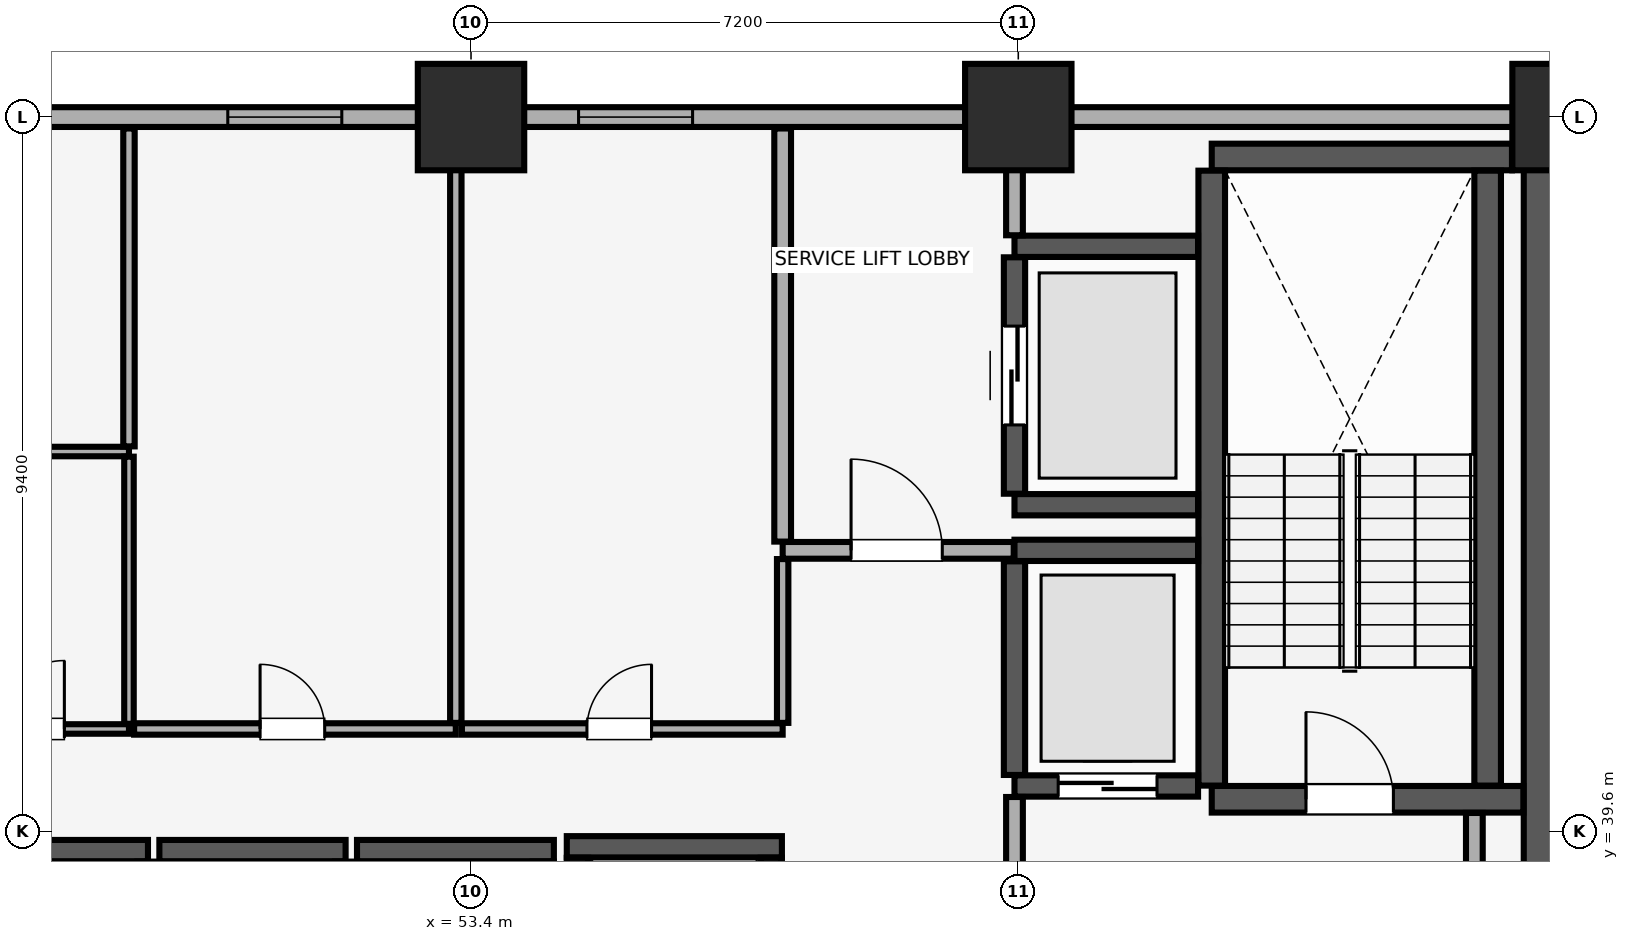
"""IFC4 building model, lengths in metres.
Left out: names, types, materials, properties, quantities, classifications, styles, units other than length and angle.
Written with IfcOpenShell. Run it as: python <this file> out.ifc"""

import sys

from ifc_helpers import new_model, si_unit, direction, frame, frame_2d, origin, origin_2d, place, context, subcontext, project, spatial, rectangle, extrude, element, fill, save


model = new_model("IFC4")
c1 = context("Model", 3, precision=1e-05, world=origin(), true_north=direction((0.0, 1.0)))
c2 = subcontext(c1, "Body", "Model", "MODEL_VIEW")
j1 = project(units=[si_unit("LENGTHUNIT", "METRE"), si_unit("PLANEANGLEUNIT", "RADIAN")], contexts=[c1])
p1 = place(None, origin())
s1 = spatial("IfcSite", under=j1, at=p1, CompositionType="ELEMENT")
p2 = place(p1, origin())
s2 = spatial("IfcBuilding", under=s1, at=p2, CompositionType="ELEMENT")
p3 = place(p2, frame((0.0, 0.0, 46.4)))
s3 = spatial("IfcBuildingStorey", under=s2, at=p3, CompositionType="ELEMENT", Elevation=46.4)
for number, where, z_axis, x_axis in (
    (1, (53.4, 49.0, 0.0), (0.0, 0.0, 1.0), (1.0, 0.0, 0.0)),
    (2, (60.6, 49.0, 0.0), (0.0, 0.0, 1.0), (1.0, 0.0, 0.0)),
    (3, (67.8, 49.0, 0.0), (0.0, 0.0, 1.0), (1.0, 0.0, 0.0)),
):
    element("IfcColumn", number, at=place(p3, frame(where, z_axis=z_axis, x_axis=x_axis)), inside=s3, PredefinedType="COLUMN", context=c2, shape_type="SweptSolid", body=[
        extrude(rectangle(XDim=1.4, YDim=1.4, at=origin_2d()), origin(), (0.0, 0.0, 1.0), 3.51),
    ])
p4 = place(p3, frame((79.8, 49.0, 0.0), z_axis=(0.0, 0.0, 1.0), x_axis=(-1.0, 0.0, 0.0)))
e4 = element("IfcWall", 4, at=p4, inside=s3, PredefinedType="SOLIDWALL", context=c2, shape_type="SweptSolid", body=[
    extrude(rectangle(XDim=75.6, YDim=0.26, at=frame_2d((37.8, 0.0))), origin(), (0.0, 0.0, 1.0), 2.56),
])
p5 = place(p4, frame((72.565, 0.0, 0.85)))
e5 = element("IfcOpeningElement", 5, at=p5, cuts=e4, PredefinedType="OPENING", context=c2, shape_type="SweptSolid", body=[
    extrude(rectangle(XDim=1.5, YDim=1.4, at=frame_2d((0.75, 0.7))), frame((0.0, 0.14, 0.0), z_axis=(0.0, -1.0, 0.0), x_axis=(1.0, 0.0, 0.0)), (0.0, 0.0, 1.0), 0.28),
])
p6 = place(p4, frame((67.45, 0.0, 0.85)))
e6 = element("IfcOpeningElement", 6, at=p6, cuts=e4, PredefinedType="OPENING", context=c2, shape_type="SweptSolid", body=[
    extrude(rectangle(XDim=1.5, YDim=1.4, at=frame_2d((0.75, 0.7))), frame((0.0, 0.14, 0.0), z_axis=(0.0, -1.0, 0.0), x_axis=(1.0, 0.0, 0.0)), (0.0, 0.0, 1.0), 0.28),
])
p7 = place(p4, frame((6.65, 0.0, 0.85)))
e7 = element("IfcOpeningElement", 7, at=p7, cuts=e4, PredefinedType="OPENING", context=c2, shape_type="SweptSolid", body=[
    extrude(rectangle(XDim=1.5, YDim=1.4, at=frame_2d((0.75, 0.7))), frame((0.0, 0.14, 0.0), z_axis=(0.0, -1.0, 0.0), x_axis=(1.0, 0.0, 0.0)), (0.0, 0.0, 1.0), 0.28),
])
p8 = place(p4, frame((1.535, 0.0, 0.85)))
e8 = element("IfcOpeningElement", 8, at=p8, cuts=e4, PredefinedType="OPENING", context=c2, shape_type="SweptSolid", body=[
    extrude(rectangle(XDim=1.5, YDim=1.4, at=frame_2d((0.75, 0.7))), frame((0.0, 0.14, 0.0), z_axis=(0.0, -1.0, 0.0), x_axis=(1.0, 0.0, 0.0)), (0.0, 0.0, 1.0), 0.28),
])
p9 = place(p4, frame((51.365, 0.0, 0.9)))
e9 = element("IfcOpeningElement", 9, at=p9, cuts=e4, PredefinedType="OPENING", context=c2, shape_type="SweptSolid", body=[
    extrude(rectangle(XDim=1.5, YDim=1.4, at=frame_2d((0.75, 0.7))), frame((0.0, 0.14, 0.0), z_axis=(0.0, -1.0, 0.0), x_axis=(1.0, 0.0, 0.0)), (0.0, 0.0, 1.0), 0.28),
])
p10 = place(p4, frame((44.55, 0.0, 0.9)))
e10 = element("IfcOpeningElement", 10, at=p10, cuts=e4, PredefinedType="OPENING", context=c2, shape_type="SweptSolid", body=[
    extrude(rectangle(XDim=1.5, YDim=1.4, at=frame_2d((0.75, 0.7))), frame((0.0, 0.14, 0.0), z_axis=(0.0, -1.0, 0.0), x_axis=(1.0, 0.0, 0.0)), (0.0, 0.0, 1.0), 0.28),
])
p11 = place(p4, frame((28.1, 0.0, 0.9)))
e11 = element("IfcOpeningElement", 11, at=p11, cuts=e4, PredefinedType="OPENING", context=c2, shape_type="SweptSolid", body=[
    extrude(rectangle(XDim=1.5, YDim=1.4, at=frame_2d((0.75, 0.7))), frame((0.0, 0.14, 0.0), z_axis=(0.0, -1.0, 0.0), x_axis=(1.0, 0.0, 0.0)), (0.0, 0.0, 1.0), 0.28),
])
p12 = place(p4, frame((23.485, 0.0, 0.9)))
e12 = element("IfcOpeningElement", 12, at=p12, cuts=e4, PredefinedType="OPENING", context=c2, shape_type="SweptSolid", body=[
    extrude(rectangle(XDim=1.5, YDim=1.4, at=frame_2d((0.75, 0.7))), frame((0.0, 0.14, 0.0), z_axis=(0.0, -1.0, 0.0), x_axis=(1.0, 0.0, 0.0)), (0.0, 0.0, 1.0), 0.28),
])
p13 = place(p3, frame((67.8, 29.4, 0.0), z_axis=(0.0, 0.0, 1.0), x_axis=(0.0, 1.0, 0.0)))
e13 = element("IfcWall", 13, at=p13, inside=s3, PredefinedType="SHEAR", context=c2, shape_type="SweptSolid", body=[
    extrude(rectangle(XDim=19.2, YDim=1.1, at=frame_2d((9.6, 0.0))), origin(), (0.0, 0.0, 1.0), 3.51),
])
p14 = place(p3, frame((63.145, 40.025, 0.0), z_axis=(0.0, 0.0, 1.0), x_axis=(1.0, 0.0, 0.0)))
e14 = element("IfcWall", 14, at=p14, inside=s3, PredefinedType="SHEAR", context=c2, shape_type="SweptSolid", body=[
    extrude(rectangle(XDim=4.1, YDim=0.35, at=frame_2d((2.05, 0.0))), origin(), (0.0, 0.0, 1.0), 3.51),
])
p15 = place(p14, frame((1.24, 0.0, 0.0)))
e15 = element("IfcOpeningElement", 15, at=p15, cuts=e14, PredefinedType="OPENING", context=c2, shape_type="SweptSolid", body=[
    extrude(rectangle(XDim=1.15, YDim=2.15, at=frame_2d((0.575, 1.075))), frame((0.0, 0.185, 0.0), z_axis=(0.0, -1.0, 0.0), x_axis=(1.0, 0.0, 0.0)), (0.0, 0.0, 1.0), 0.37),
])
p16 = place(p3, frame((63.145, 48.475, 0.0), z_axis=(0.0, 0.0, 1.0), x_axis=(1.0, 0.0, 0.0)))
e16 = element("IfcWall", 16, at=p16, inside=s3, PredefinedType="SHEAR", context=c2, shape_type="SweptSolid", body=[
    extrude(rectangle(XDim=3.95, YDim=0.35, at=frame_2d((1.975, 0.0))), origin(), (0.0, 0.0, 1.0), 3.51),
])
for number, where, z_axis, x_axis in (
    (17, (63.145, 40.205, 0.0), (0.0, 0.0, 1.0), (0.0, 1.0, 0.0)),
    (18, (66.775, 40.205, 0.0), (0.0, 0.0, 1.0), (0.0, 1.0, 0.0)),
):
    element("IfcWall", number, at=place(p3, frame(where, z_axis=z_axis, x_axis=x_axis)), inside=s3, PredefinedType="SHEAR", context=c2, shape_type="SweptSolid", body=[
        extrude(rectangle(XDim=8.09, YDim=0.35, at=frame_2d((4.045, 0.0))), origin(), (0.0, 0.0, 1.0), 3.51),
    ])
p17 = place(p3, frame((46.7, 39.35, 0.0), z_axis=(0.0, 0.0, 1.0), x_axis=(1.0, 0.0, 0.0)))
e19 = element("IfcWall", 19, at=p17, inside=s3, PredefinedType="SHEAR", context=c2, shape_type="SweptSolid", body=[
    extrude(rectangle(XDim=2.45, YDim=0.28, at=frame_2d((1.225, 0.0))), origin(), (0.0, 0.0, 1.0), 3.51),
])
p18 = place(p3, frame((49.15, 37.145, 0.0), z_axis=(0.0, 0.0, 1.0), x_axis=(0.0, 1.0, 0.0)))
e20 = element("IfcWall", 20, at=p18, inside=s3, PredefinedType="SHEAR", context=c2, shape_type="SweptSolid", body=[
    extrude(rectangle(XDim=2.06, YDim=0.28, at=frame_2d((1.03, 0.0))), origin(), (0.0, 0.0, 1.0), 3.51),
])
p19 = place(p3, frame((49.3, 39.35, 0.0), z_axis=(0.0, 0.0, 1.0), x_axis=(1.0, 0.0, 0.0)))
e21 = element("IfcWall", 21, at=p19, inside=s3, PredefinedType="SHEAR", context=c2, shape_type="SweptSolid", body=[
    extrude(rectangle(XDim=2.45, YDim=0.28, at=frame_2d((1.225, 0.0))), origin(), (0.0, 0.0, 1.0), 3.51),
])
p20 = place(p3, frame((51.75, 37.145, 0.0), z_axis=(0.0, 0.0, 1.0), x_axis=(0.0, 1.0, 0.0)))
e22 = element("IfcWall", 22, at=p20, inside=s3, PredefinedType="SHEAR", context=c2, shape_type="SweptSolid", body=[
    extrude(rectangle(XDim=2.06, YDim=0.28, at=frame_2d((1.03, 0.0))), origin(), (0.0, 0.0, 1.0), 3.51),
])
p21 = place(p3, frame((51.9, 39.35, 0.0), z_axis=(0.0, 0.0, 1.0), x_axis=(1.0, 0.0, 0.0)))
e23 = element("IfcWall", 23, at=p21, inside=s3, PredefinedType="SHEAR", context=c2, shape_type="SweptSolid", body=[
    extrude(rectangle(XDim=2.59, YDim=0.28, at=frame_2d((1.295, 0.0))), origin(), (0.0, 0.0, 1.0), 3.51),
])
p22 = place(p3, frame((54.35, 37.145, 0.0), z_axis=(0.0, 0.0, 1.0), x_axis=(0.0, 1.0, 0.0)))
e24 = element("IfcWall", 24, at=p22, inside=s3, PredefinedType="SHEAR", context=c2, shape_type="SweptSolid", body=[
    extrude(rectangle(XDim=2.06, YDim=0.28, at=frame_2d((1.03, 0.0))), origin(), (0.0, 0.0, 1.0), 3.51),
])
p23 = place(p3, frame((54.66, 39.4, 0.0), z_axis=(0.0, 0.0, 1.0), x_axis=(1.0, 0.0, 0.0)))
e25 = element("IfcWall", 25, at=p23, inside=s3, PredefinedType="SHEAR", context=c2, shape_type="SweptSolid", body=[
    extrude(rectangle(XDim=2.83, YDim=0.28, at=frame_2d((1.415, 0.0))), origin(), (0.0, 0.0, 1.0), 3.51),
])
for number, where, z_axis, x_axis in (
    (26, (54.8, 37.145, 0.0), (0.0, 0.0, 1.0), (0.0, 1.0, 0.0)),
    (27, (57.35, 37.145, 0.0), (0.0, 0.0, 1.0), (0.0, 1.0, 0.0)),
):
    element("IfcWall", number, at=place(p3, frame(where, z_axis=z_axis, x_axis=x_axis)), inside=s3, PredefinedType="SHEAR", context=c2, shape_type="SweptSolid", body=[
        extrude(rectangle(XDim=2.11, YDim=0.28, at=frame_2d((1.055, 0.0))), origin(), (0.0, 0.0, 1.0), 3.51),
    ])
p24 = place(p3, frame((60.55, 40.2, 0.0), z_axis=(0.0, 0.0, 1.0), x_axis=(1.0, 0.0, 0.0)))
e28 = element("IfcWall", 28, at=p24, inside=s3, PredefinedType="SHEAR", context=c2, shape_type="SweptSolid", body=[
    extrude(rectangle(XDim=2.415, YDim=0.28, at=frame_2d((1.208, 0.0))), origin(), (0.0, 0.0, 1.0), 3.51),
])
p25 = place(p24, frame((0.575, 0.0, 0.0)))
e29 = element("IfcOpeningElement", 29, at=p25, cuts=e28, PredefinedType="OPENING", context=c2, shape_type="SweptSolid", body=[
    extrude(rectangle(XDim=1.3, YDim=2.3, at=frame_2d((0.65, 1.15))), frame((0.0, 0.15, 0.0), z_axis=(0.0, -1.0, 0.0), x_axis=(1.0, 0.0, 0.0)), (0.0, 0.0, 1.0), 0.3),
])
p26 = place(p3, frame((60.55, 43.3, 0.0), z_axis=(0.0, 0.0, 1.0), x_axis=(1.0, 0.0, 0.0)))
e30 = element("IfcWall", 30, at=p26, inside=s3, PredefinedType="SHEAR", context=c2, shape_type="SweptSolid", body=[
    extrude(rectangle(XDim=2.415, YDim=0.28, at=frame_2d((1.208, 0.0))), origin(), (0.0, 0.0, 1.0), 3.51),
])
p27 = place(p3, frame((60.55, 40.345, 0.0), z_axis=(0.0, 0.0, 1.0), x_axis=(0.0, 1.0, 0.0)))
e31 = element("IfcWall", 31, at=p27, inside=s3, PredefinedType="SHEAR", context=c2, shape_type="SweptSolid", body=[
    extrude(rectangle(XDim=2.81, YDim=0.28, at=frame_2d((1.405, 0.0))), origin(), (0.0, 0.0, 1.0), 3.51),
])
for number, where, z_axis, x_axis in (
    (32, (60.55, 43.9, 0.0), (0.0, 0.0, 1.0), (1.0, 0.0, 0.0)),
    (33, (60.55, 47.3, 0.0), (0.0, 0.0, 1.0), (1.0, 0.0, 0.0)),
):
    element("IfcWall", number, at=place(p3, frame(where, z_axis=z_axis, x_axis=x_axis)), inside=s3, PredefinedType="SHEAR", context=c2, shape_type="SweptSolid", body=[
        extrude(rectangle(XDim=2.415, YDim=0.28, at=frame_2d((1.208, 0.0))), origin(), (0.0, 0.0, 1.0), 3.51),
    ])
p28 = place(p3, frame((60.55, 44.045, 0.0), z_axis=(0.0, 0.0, 1.0), x_axis=(0.0, 1.0, 0.0)))
e34 = element("IfcWall", 34, at=p28, inside=s3, PredefinedType="SHEAR", context=c2, shape_type="SweptSolid", body=[
    extrude(rectangle(XDim=3.11, YDim=0.28, at=frame_2d((1.555, 0.0))), origin(), (0.0, 0.0, 1.0), 3.51),
])
p29 = place(p28, frame((0.905, 0.0, 0.0)))
e35 = element("IfcOpeningElement", 35, at=p29, cuts=e34, PredefinedType="OPENING", context=c2, shape_type="SweptSolid", body=[
    extrude(rectangle(XDim=1.3, YDim=2.3, at=frame_2d((0.65, 1.15))), frame((0.0, 0.15, 0.0), z_axis=(0.0, -1.0, 0.0), x_axis=(1.0, 0.0, 0.0)), (0.0, 0.0, 1.0), 0.3),
])
p30 = place(p3, frame((60.55, 34.415, 0.0), z_axis=(0.0, 0.0, 1.0), x_axis=(0.0, 1.0, 0.0)))
e36 = element("IfcWall", 36, at=p30, inside=s3, PredefinedType="PARTITIONING", context=c2, shape_type="SweptSolid", body=[
    extrude(rectangle(XDim=5.64, YDim=0.22, at=frame_2d((2.82, 0.0))), origin(), (0.0, 0.0, 1.0), 3.51),
])
p31 = place(p3, frame((66.6, 34.415, 0.0), z_axis=(0.0, 0.0, 1.0), x_axis=(0.0, 1.0, 0.0)))
e37 = element("IfcWall", 37, at=p31, inside=s3, PredefinedType="PARTITIONING", context=c2, shape_type="SweptSolid", body=[
    extrude(rectangle(XDim=5.43, YDim=0.22, at=frame_2d((2.715, 0.0))), origin(), (0.0, 0.0, 1.0), 3.51),
])
p32 = place(p3, frame((57.5, 43.3, 0.0), z_axis=(0.0, 0.0, 1.0), x_axis=(1.0, 0.0, 0.0)))
e38 = element("IfcWall", 38, at=p32, inside=s3, PredefinedType="PARTITIONING", context=c2, shape_type="SweptSolid", body=[
    extrude(rectangle(XDim=3.04, YDim=0.22, at=frame_2d((1.52, 0.0))), origin(), (0.0, 0.0, 1.0), 3.51),
])
p33 = place(p32, frame((0.9, 0.0, 0.0)))
e39 = element("IfcOpeningElement", 39, at=p33, cuts=e38, PredefinedType="OPENING", context=c2, shape_type="SweptSolid", body=[
    extrude(rectangle(XDim=1.2, YDim=2.15, at=frame_2d((0.6, 1.075))), frame((0.0, 0.12, 0.0), z_axis=(0.0, -1.0, 0.0), x_axis=(1.0, 0.0, 0.0)), (0.0, 0.0, 1.0), 0.24),
])
p34 = place(p3, frame((57.5, 43.415, 0.0), z_axis=(0.0, 0.0, 1.0), x_axis=(0.0, 1.0, 0.0)))
e40 = element("IfcWall", 40, at=p34, inside=s3, PredefinedType="PARTITIONING", context=c2, shape_type="SweptSolid", body=[
    extrude(rectangle(XDim=5.435, YDim=0.22, at=frame_2d((2.718, 0.0))), origin(), (0.0, 0.0, 1.0), 3.51),
])
p35 = place(p3, frame((60.55, 47.445, 0.0), z_axis=(0.0, 0.0, 1.0), x_axis=(0.0, 1.0, 0.0)))
e41 = element("IfcWall", 41, at=p35, inside=s3, PredefinedType="PARTITIONING", context=c2, shape_type="SweptSolid", body=[
    extrude(rectangle(XDim=1.405, YDim=0.22, at=frame_2d((0.703, 0.0))), origin(), (0.0, 0.0, 1.0), 3.51),
])
p36 = place(p3, frame((44.3, 40.95, 0.0), z_axis=(0.0, 0.0, 1.0), x_axis=(1.0, 0.0, 0.0)))
e42 = element("IfcWall", 42, at=p36, inside=s3, PredefinedType="PARTITIONING", context=c2, shape_type="SweptSolid", body=[
    extrude(rectangle(XDim=4.6, YDim=0.125, at=frame_2d((2.3, 0.0))), origin(), (0.0, 0.0, 1.0), 3.51),
])
p37 = place(p36, frame((2.85, 0.0, 0.0)))
e43 = element("IfcOpeningElement", 43, at=p37, cuts=e42, PredefinedType="OPENING", context=c2, shape_type="SweptSolid", body=[
    extrude(rectangle(XDim=0.9, YDim=2.1, at=frame_2d((0.45, 1.05))), frame((0.0, 0.073, 0.0), z_axis=(0.0, -1.0, 0.0), x_axis=(1.0, 0.0, 0.0)), (0.0, 0.0, 1.0), 0.145),
])
p38 = place(p3, frame((44.3, 44.6, 0.0), z_axis=(0.0, 0.0, 1.0), x_axis=(1.0, 0.0, 0.0)))
e44 = element("IfcWall", 44, at=p38, inside=s3, PredefinedType="PARTITIONING", context=c2, shape_type="SweptSolid", body=[
    extrude(rectangle(XDim=4.6, YDim=0.125, at=frame_2d((2.3, 0.0))), origin(), (0.0, 0.0, 1.0), 3.51),
])
p39 = place(p3, frame((48.9, 41.018, 0.0), z_axis=(0.0, 0.0, 1.0), x_axis=(0.0, 1.0, 0.0)))
e45 = element("IfcWall", 45, at=p39, inside=s3, PredefinedType="PARTITIONING", context=c2, shape_type="SweptSolid", body=[
    extrude(rectangle(XDim=3.515, YDim=0.125, at=frame_2d((1.757, 0.0))), origin(), (0.0, 0.0, 1.0), 3.51),
])
p40 = place(p3, frame((48.968, 40.95, 0.0), z_axis=(0.0, 0.0, 1.0), x_axis=(1.0, 0.0, 0.0)))
e46 = element("IfcWall", 46, at=p40, inside=s3, PredefinedType="PARTITIONING", context=c2, shape_type="SweptSolid", body=[
    extrude(rectangle(XDim=4.232, YDim=0.15, at=frame_2d((2.116, 0.0))), origin(), (0.0, 0.0, 1.0), 3.51),
])
p41 = place(p40, frame((1.657, 0.0, 0.0)))
e47 = element("IfcOpeningElement", 47, at=p41, cuts=e46, PredefinedType="OPENING", context=c2, shape_type="SweptSolid", body=[
    extrude(rectangle(XDim=0.85, YDim=2.1, at=frame_2d((0.425, 1.05))), frame((0.0, 0.085, 0.0), z_axis=(0.0, -1.0, 0.0), x_axis=(1.0, 0.0, 0.0)), (0.0, 0.0, 1.0), 0.17),
])
p42 = place(p3, frame((48.9, 44.667, 0.0), z_axis=(0.0, 0.0, 1.0), x_axis=(0.0, 1.0, 0.0)))
e48 = element("IfcWall", 48, at=p42, inside=s3, PredefinedType="PARTITIONING", context=c2, shape_type="SweptSolid", body=[
    extrude(rectangle(XDim=4.183, YDim=0.15, at=frame_2d((2.091, 0.0))), origin(), (0.0, 0.0, 1.0), 3.51),
])
p43 = place(p3, frame((53.2, 41.03, 0.0), z_axis=(0.0, 0.0, 1.0), x_axis=(0.0, 1.0, 0.0)))
e49 = element("IfcWall", 49, at=p43, inside=s3, PredefinedType="PARTITIONING", context=c2, shape_type="SweptSolid", body=[
    extrude(rectangle(XDim=7.82, YDim=0.15, at=frame_2d((3.91, 0.0))), origin(), (0.0, 0.0, 1.0), 3.51),
])
p44 = place(p3, frame((53.28, 40.95, 0.0), z_axis=(0.0, 0.0, 1.0), x_axis=(1.0, 0.0, 0.0)))
e50 = element("IfcWall", 50, at=p44, inside=s3, PredefinedType="PARTITIONING", context=c2, shape_type="SweptSolid", body=[
    extrude(rectangle(XDim=4.22, YDim=0.15, at=frame_2d((2.11, 0.0))), origin(), (0.0, 0.0, 1.0), 3.51),
])
p45 = place(p44, frame((1.645, 0.0, 0.0)))
e51 = element("IfcOpeningElement", 51, at=p45, cuts=e50, PredefinedType="OPENING", context=c2, shape_type="SweptSolid", body=[
    extrude(rectangle(XDim=0.85, YDim=2.1, at=frame_2d((0.425, 1.05))), frame((0.0, 0.085, 0.0), z_axis=(0.0, -1.0, 0.0), x_axis=(1.0, 0.0, 0.0)), (0.0, 0.0, 1.0), 0.17),
])
p46 = place(p3, frame((57.5, 41.03, 0.0), z_axis=(0.0, 0.0, 1.0), x_axis=(0.0, 1.0, 0.0)))
e52 = element("IfcWall", 52, at=p46, inside=s3, PredefinedType="PARTITIONING", context=c2, shape_type="SweptSolid", body=[
    extrude(rectangle(XDim=2.155, YDim=0.15, at=frame_2d((1.078, 0.0))), origin(), (0.0, 0.0, 1.0), 3.51),
])
p47 = place(p11, origin())
e53 = element("IfcWindow", 53, at=p47, inside=s3, PartitioningType="SINGLE_PANEL", PredefinedType="WINDOW", context=c2, shape_type="SweptSolid", body=[
    extrude(rectangle(XDim=1.5, YDim=1.4, at=frame_2d((0.75, 0.7))), frame((0.0, 0.03, 0.0), z_axis=(0.0, -1.0, 0.0), x_axis=(1.0, 0.0, 0.0)), (0.0, 0.0, 1.0), 0.06),
])
fill(e11, e53)
p48 = place(p12, origin())
e54 = element("IfcWindow", 54, at=p48, inside=s3, PartitioningType="SINGLE_PANEL", PredefinedType="WINDOW", context=c2, shape_type="SweptSolid", body=[
    extrude(rectangle(XDim=1.5, YDim=1.4, at=frame_2d((0.75, 0.7))), frame((0.0, 0.03, 0.0), z_axis=(0.0, -1.0, 0.0), x_axis=(1.0, 0.0, 0.0)), (0.0, 0.0, 1.0), 0.06),
])
fill(e12, e54)
p49 = place(p15, origin())
e55 = element("IfcDoor", 55, at=p49, inside=s3, OperationType="SINGLE_SWING_LEFT", PredefinedType="DOOR", context=c2, shape_type="SweptSolid", body=[
    extrude(rectangle(XDim=1.15, YDim=2.15, at=frame_2d((0.575, 1.075))), frame((0.0, 0.025, 0.0), z_axis=(0.0, -1.0, 0.0), x_axis=(1.0, 0.0, 0.0)), (0.0, 0.0, 1.0), 0.05),
])
fill(e15, e55)
p50 = place(p25, origin())
e56 = element("IfcDoor", 56, at=p50, inside=s3, OperationType="DOUBLE_DOOR_SLIDING", PredefinedType="DOOR", context=c2, shape_type="SweptSolid", body=[
    extrude(rectangle(XDim=1.3, YDim=2.3, at=frame_2d((0.65, 1.15))), frame((0.0, 0.025, 0.0), z_axis=(0.0, -1.0, 0.0), x_axis=(1.0, 0.0, 0.0)), (0.0, 0.0, 1.0), 0.05),
])
fill(e29, e56)
p51 = place(p29, origin())
e57 = element("IfcDoor", 57, at=p51, inside=s3, OperationType="DOUBLE_DOOR_SLIDING", PredefinedType="DOOR", context=c2, shape_type="SweptSolid", body=[
    extrude(rectangle(XDim=1.3, YDim=2.3, at=frame_2d((0.65, 1.15))), frame((0.0, 0.025, 0.0), z_axis=(0.0, -1.0, 0.0), x_axis=(1.0, 0.0, 0.0)), (0.0, 0.0, 1.0), 0.05),
])
fill(e35, e57)
p52 = place(p33, origin())
e58 = element("IfcDoor", 58, at=p52, inside=s3, OperationType="SINGLE_SWING_LEFT", PredefinedType="DOOR", context=c2, shape_type="SweptSolid", body=[
    extrude(rectangle(XDim=1.2, YDim=2.15, at=frame_2d((0.6, 1.075))), frame((0.0, 0.025, 0.0), z_axis=(0.0, -1.0, 0.0), x_axis=(1.0, 0.0, 0.0)), (0.0, 0.0, 1.0), 0.05),
])
fill(e39, e58)
p53 = place(p37, origin())
e59 = element("IfcDoor", 59, at=p53, inside=s3, OperationType="SINGLE_SWING_RIGHT", PredefinedType="DOOR", context=c2, shape_type="SweptSolid", body=[
    extrude(rectangle(XDim=0.9, YDim=2.1, at=frame_2d((0.45, 1.05))), frame((0.0, 0.025, 0.0), z_axis=(0.0, -1.0, 0.0), x_axis=(1.0, 0.0, 0.0)), (0.0, 0.0, 1.0), 0.05),
])
fill(e43, e59)
p54 = place(p41, origin())
e60 = element("IfcDoor", 60, at=p54, inside=s3, OperationType="SINGLE_SWING_LEFT", PredefinedType="DOOR", context=c2, shape_type="SweptSolid", body=[
    extrude(rectangle(XDim=0.85, YDim=2.1, at=frame_2d((0.425, 1.05))), frame((0.0, 0.025, 0.0), z_axis=(0.0, -1.0, 0.0), x_axis=(1.0, 0.0, 0.0)), (0.0, 0.0, 1.0), 0.05),
])
fill(e47, e60)
p55 = place(p45, origin())
e61 = element("IfcDoor", 61, at=p55, inside=s3, OperationType="SINGLE_SWING_RIGHT", PredefinedType="DOOR", context=c2, shape_type="SweptSolid", body=[
    extrude(rectangle(XDim=0.85, YDim=2.1, at=frame_2d((0.425, 1.05))), frame((0.0, 0.025, 0.0), z_axis=(0.0, -1.0, 0.0), x_axis=(1.0, 0.0, 0.0)), (0.0, 0.0, 1.0), 0.05),
])
fill(e51, e61)
save(model, sys.argv[1])
